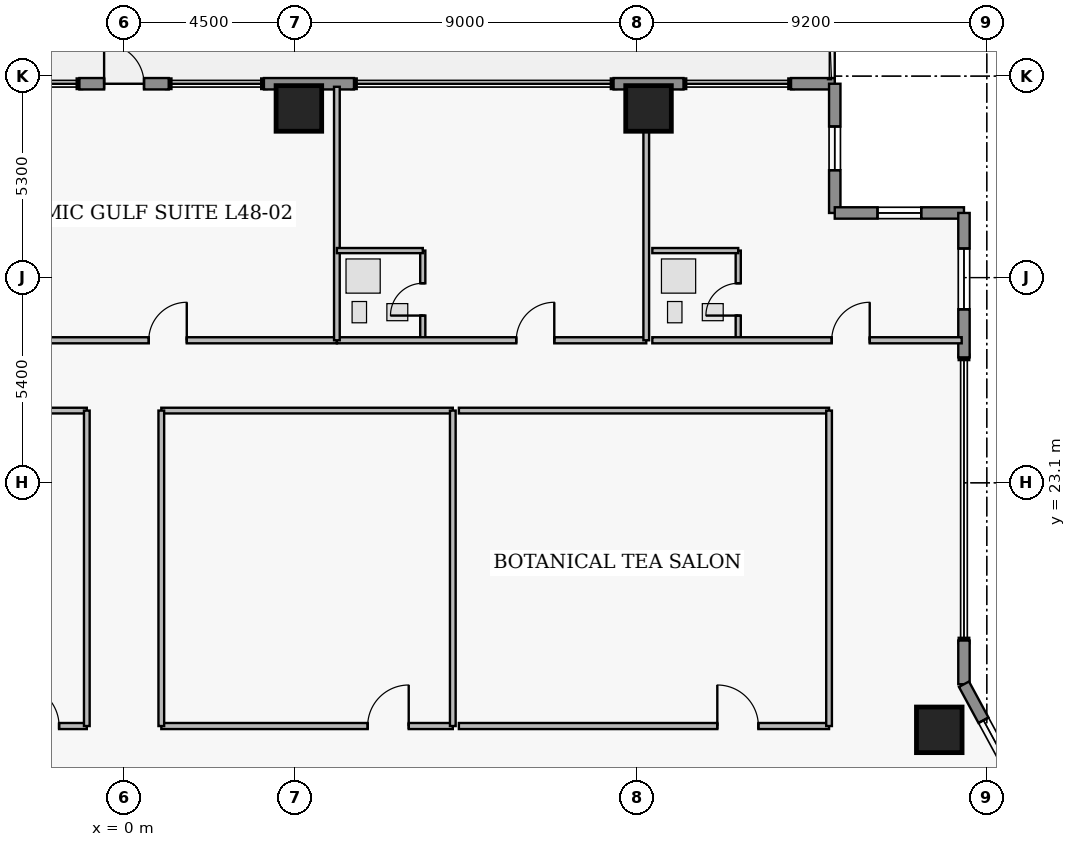
"""IFC4 building model, lengths in metres.
Left out: names, types, materials, properties, quantities, classifications, styles, units other than length and angle.
Written with IfcOpenShell. Run it as: python <this file> out.ifc"""

import sys

from ifc_helpers import new_model, si_unit, direction, frame, frame_2d, origin, origin_2d, place, context, subcontext, project, spatial, rectangle, extrude, element, fill, save


model = new_model("IFC4")
c1 = context("Model", 3, precision=1e-05, world=origin(), true_north=direction((0.0, 1.0)))
c2 = subcontext(c1, "Body", "Model", "MODEL_VIEW")
j1 = project(units=[si_unit("LENGTHUNIT", "METRE"), si_unit("PLANEANGLEUNIT", "RADIAN")], contexts=[c1])
p1 = place(None, origin())
s1 = spatial("IfcSite", under=j1, at=p1, CompositionType="ELEMENT")
p2 = place(p1, origin())
s2 = spatial("IfcBuilding", under=s1, at=p2, CompositionType="ELEMENT")
p3 = place(p2, frame((0.0, 0.0, 192.4)))
s3 = spatial("IfcBuildingStorey", under=s2, at=p3, CompositionType="ELEMENT", Elevation=192.4)
for number, where, z_axis, x_axis in (
    (1, (4.6, 32.95, 0.0), (0.0, 0.0, 1.0), (1.0, 0.0, 0.0)),
    (2, (13.8, 32.95, 0.0), (0.0, 0.0, 1.0), (1.0, 0.0, 0.0)),
    (3, (21.45, 16.6, 0.0), (0.0, 0.0, 1.0), (1.0, 0.0, 0.0)),
):
    element("IfcColumn", number, at=place(p3, frame(where, z_axis=z_axis, x_axis=x_axis)), inside=s3, PredefinedType="COLUMN", context=c2, shape_type="SweptSolid", body=[
        extrude(rectangle(XDim=1.2, YDim=1.2, at=origin_2d()), origin(), (0.0, 0.0, 1.0), 3.75),
    ])
p4 = place(p3, frame((-1.175, 33.6, 0.0), z_axis=(0.0, 0.0, 1.0), x_axis=(1.0, 0.0, 0.0)))
e4 = element("IfcWall", 4, at=p4, inside=s3, PredefinedType="STANDARD", context=c2, shape_type="SweptSolid", body=[
    extrude(rectangle(XDim=2.35, YDim=0.3, at=frame_2d((1.175, 0.0))), origin(), (0.0, 0.0, 1.0), 3.53),
])
p5 = place(p4, frame((0.65, 0.0, 0.0)))
e5 = element("IfcOpeningElement", 5, at=p5, cuts=e4, PredefinedType="OPENING", context=c2, shape_type="SweptSolid", body=[
    extrude(rectangle(XDim=1.05, YDim=2.2, at=frame_2d((0.525, 1.1))), frame((0.0, 0.16, 0.0), z_axis=(0.0, -1.0, 0.0), x_axis=(1.0, 0.0, 0.0)), (0.0, 0.0, 1.0), 0.32),
])
p6 = place(p3, frame((3.68, 33.6, 0.0), z_axis=(0.0, 0.0, 1.0), x_axis=(1.0, 0.0, 0.0)))
e6 = element("IfcWall", 6, at=p6, inside=s3, PredefinedType="STANDARD", context=c2, shape_type="SweptSolid", body=[
    extrude(rectangle(XDim=2.37, YDim=0.3, at=frame_2d((1.185, 0.0))), origin(), (0.0, 0.0, 1.0), 3.53),
])
p7 = place(p3, frame((12.88, 33.6, 0.0), z_axis=(0.0, 0.0, 1.0), x_axis=(1.0, 0.0, 0.0)))
e7 = element("IfcWall", 7, at=p7, inside=s3, PredefinedType="STANDARD", context=c2, shape_type="SweptSolid", body=[
    extrude(rectangle(XDim=1.84, YDim=0.3, at=frame_2d((0.92, 0.0))), origin(), (0.0, 0.0, 1.0), 3.53),
])
p8 = place(p3, frame((17.55, 33.6, 0.0), z_axis=(0.0, 0.0, 1.0), x_axis=(1.0, 0.0, 0.0)))
e8 = element("IfcWall", 8, at=p8, inside=s3, PredefinedType="STANDARD", context=c2, shape_type="SweptSolid", body=[
    extrude(rectangle(XDim=1.15, YDim=0.3, at=frame_2d((0.575, 0.0))), origin(), (0.0, 0.0, 1.0), 3.53),
])
p9 = place(p3, frame((18.7, 33.6, 0.0), z_axis=(0.0, 0.0, 1.0), x_axis=(0.0, -1.0, 0.0)))
e9 = element("IfcWall", 9, at=p9, inside=s3, PredefinedType="STANDARD", context=c2, shape_type="SweptSolid", body=[
    extrude(rectangle(XDim=3.4, YDim=0.3, at=frame_2d((1.7, 0.0))), origin(), (0.0, 0.0, 1.0), 3.53),
])
p10 = place(p9, frame((1.125, 0.0, 1.25)))
e10 = element("IfcOpeningElement", 10, at=p10, cuts=e9, PredefinedType="OPENING", context=c2, shape_type="SweptSolid", body=[
    extrude(rectangle(XDim=1.15, YDim=1.55, at=frame_2d((0.575, 0.775))), frame((0.0, 0.16, 0.0), z_axis=(0.0, -1.0, 0.0), x_axis=(1.0, 0.0, 0.0)), (0.0, 0.0, 1.0), 0.32),
])
p11 = place(p3, frame((18.7, 30.2, 0.0), z_axis=(0.0, 0.0, 1.0), x_axis=(1.0, 0.0, 0.0)))
e11 = element("IfcWall", 11, at=p11, inside=s3, PredefinedType="STANDARD", context=c2, shape_type="SweptSolid", body=[
    extrude(rectangle(XDim=3.4, YDim=0.3, at=frame_2d((1.7, 0.0))), origin(), (0.0, 0.0, 1.0), 3.53),
])
p12 = place(p11, frame((1.125, 0.0, 1.25)))
e12 = element("IfcOpeningElement", 12, at=p12, cuts=e11, PredefinedType="OPENING", context=c2, shape_type="SweptSolid", body=[
    extrude(rectangle(XDim=1.15, YDim=1.55, at=frame_2d((0.575, 0.775))), frame((0.0, 0.16, 0.0), z_axis=(0.0, -1.0, 0.0), x_axis=(1.0, 0.0, 0.0)), (0.0, 0.0, 1.0), 0.32),
])
p13 = place(p3, frame((22.1, 30.2, 0.0), z_axis=(0.0, 0.0, 1.0), x_axis=(0.0, -1.0, 0.0)))
e13 = element("IfcWall", 13, at=p13, inside=s3, PredefinedType="STANDARD", context=c2, shape_type="SweptSolid", body=[
    extrude(rectangle(XDim=3.8, YDim=0.3, at=frame_2d((1.9, 0.0))), origin(), (0.0, 0.0, 1.0), 3.53),
])
p14 = place(p13, frame((0.935, 0.0, 0.85)))
e14 = element("IfcOpeningElement", 14, at=p14, cuts=e13, PredefinedType="OPENING", context=c2, shape_type="SweptSolid", body=[
    extrude(rectangle(XDim=1.6, YDim=1.8, at=frame_2d((0.8, 0.9))), frame((0.0, 0.16, 0.0), z_axis=(0.0, -1.0, 0.0), x_axis=(1.0, 0.0, 0.0)), (0.0, 0.0, 1.0), 0.32),
])
p15 = place(p3, frame((22.1, 18.95, 0.0), z_axis=(0.0, 0.0, 1.0), x_axis=(0.0, -1.0, 0.0)))
e15 = element("IfcWall", 15, at=p15, inside=s3, PredefinedType="STANDARD", context=c2, shape_type="SweptSolid", body=[
    extrude(rectangle(XDim=1.15, YDim=0.3, at=frame_2d((0.575, 0.0))), origin(), (0.0, 0.0, 1.0), 3.53),
])
p16 = place(p3, frame((22.1, 17.8, 0.0), z_axis=(0.0, 0.0, 1.0), x_axis=(0.476258655584, -0.879305233114, 0.0)))
e16 = element("IfcWall", 16, at=p16, inside=s3, PredefinedType="STANDARD", context=c2, shape_type="SweptSolid", body=[
    extrude(rectangle(XDim=5.459, YDim=0.3, at=frame_2d((2.729, 0.0))), origin(), (0.0, 0.0, 1.0), 3.53),
])
p17 = place(p16, frame((1.078, 0.0, 1.25)))
e17 = element("IfcOpeningElement", 17, at=p17, cuts=e16, PredefinedType="OPENING", context=c2, shape_type="SweptSolid", body=[
    extrude(rectangle(XDim=1.15, YDim=1.55, at=frame_2d((0.575, 0.775))), frame((0.0, 0.16, 0.0), z_axis=(0.0, -1.0, 0.0), x_axis=(1.0, 0.0, 0.0)), (0.0, 0.0, 1.0), 0.32),
])
p18 = place(p3, frame((-5.6, 26.85, 0.0), z_axis=(0.0, 0.0, 1.0), x_axis=(1.0, 0.0, 0.0)))
e18 = element("IfcWall", 18, at=p18, inside=s3, PredefinedType="PARTITIONING", context=c2, shape_type="SweptSolid", body=[
    extrude(rectangle(XDim=11.2, YDim=0.16, at=frame_2d((5.6, 0.0))), origin(), (0.0, 0.0, 1.0), 3.53),
])
p19 = place(p18, frame((6.25, 0.0, 0.0)))
e19 = element("IfcOpeningElement", 19, at=p19, cuts=e18, PredefinedType="OPENING", context=c2, shape_type="SweptSolid", body=[
    extrude(rectangle(XDim=1.0, YDim=2.15, at=frame_2d((0.5, 1.075))), frame((0.0, 0.09, 0.0), z_axis=(0.0, -1.0, 0.0), x_axis=(1.0, 0.0, 0.0)), (0.0, 0.0, 1.0), 0.18),
])
p20 = place(p3, frame((7.86, 26.85, 0.0), z_axis=(0.0, 0.0, 1.0), x_axis=(0.0, 1.0, 0.0)))
e20 = element("IfcWall", 20, at=p20, inside=s3, PredefinedType="PLUMBINGWALL", context=c2, shape_type="SweptSolid", body=[
    extrude(rectangle(XDim=2.36, YDim=0.135, at=frame_2d((1.18, 0.0))), origin(), (0.0, 0.0, 1.0), 3.53),
])
p21 = place(p20, frame((0.65, 0.0, 0.0)))
e21 = element("IfcOpeningElement", 21, at=p21, cuts=e20, PredefinedType="OPENING", context=c2, shape_type="SweptSolid", body=[
    extrude(rectangle(XDim=0.85, YDim=2.1, at=frame_2d((0.425, 1.05))), frame((0.0, 0.077, 0.0), z_axis=(0.0, -1.0, 0.0), x_axis=(1.0, 0.0, 0.0)), (0.0, 0.0, 1.0), 0.155),
])
p22 = place(p3, frame((5.6, 26.85, 0.0), z_axis=(0.0, 0.0, 1.0), x_axis=(1.0, 0.0, 0.0)))
e22 = element("IfcWall", 22, at=p22, inside=s3, PredefinedType="PARTITIONING", context=c2, shape_type="SweptSolid", body=[
    extrude(rectangle(XDim=8.14, YDim=0.16, at=frame_2d((4.07, 0.0))), origin(), (0.0, 0.0, 1.0), 3.53),
])
p23 = place(p22, frame((4.72, 0.0, 0.0)))
e23 = element("IfcOpeningElement", 23, at=p23, cuts=e22, PredefinedType="OPENING", context=c2, shape_type="SweptSolid", body=[
    extrude(rectangle(XDim=1.0, YDim=2.15, at=frame_2d((0.5, 1.075))), frame((0.0, 0.09, 0.0), z_axis=(0.0, -1.0, 0.0), x_axis=(1.0, 0.0, 0.0)), (0.0, 0.0, 1.0), 0.18),
])
p24 = place(p3, frame((16.16, 26.85, 0.0), z_axis=(0.0, 0.0, 1.0), x_axis=(0.0, 1.0, 0.0)))
e24 = element("IfcWall", 24, at=p24, inside=s3, PredefinedType="PLUMBINGWALL", context=c2, shape_type="SweptSolid", body=[
    extrude(rectangle(XDim=2.36, YDim=0.135, at=frame_2d((1.18, 0.0))), origin(), (0.0, 0.0, 1.0), 3.53),
])
p25 = place(p24, frame((0.65, 0.0, 0.0)))
e25 = element("IfcOpeningElement", 25, at=p25, cuts=e24, PredefinedType="OPENING", context=c2, shape_type="SweptSolid", body=[
    extrude(rectangle(XDim=0.85, YDim=2.1, at=frame_2d((0.425, 1.05))), frame((0.0, 0.077, 0.0), z_axis=(0.0, -1.0, 0.0), x_axis=(1.0, 0.0, 0.0)), (0.0, 0.0, 1.0), 0.155),
])
p26 = place(p3, frame((13.9, 26.85, 0.0), z_axis=(0.0, 0.0, 1.0), x_axis=(1.0, 0.0, 0.0)))
e26 = element("IfcWall", 26, at=p26, inside=s3, PredefinedType="PARTITIONING", context=c2, shape_type="SweptSolid", body=[
    extrude(rectangle(XDim=8.14, YDim=0.16, at=frame_2d((4.07, 0.0))), origin(), (0.0, 0.0, 1.0), 3.53),
])
p27 = place(p26, frame((4.72, 0.0, 0.0)))
e27 = element("IfcOpeningElement", 27, at=p27, cuts=e26, PredefinedType="OPENING", context=c2, shape_type="SweptSolid", body=[
    extrude(rectangle(XDim=1.0, YDim=2.15, at=frame_2d((0.5, 1.075))), frame((0.0, 0.09, 0.0), z_axis=(0.0, -1.0, 0.0), x_axis=(1.0, 0.0, 0.0)), (0.0, 0.0, 1.0), 0.18),
])
p28 = place(p3, frame((-8.59, 16.7, 0.0), z_axis=(0.0, 0.0, 1.0), x_axis=(1.0, 0.0, 0.0)))
e28 = element("IfcWall", 28, at=p28, inside=s3, PredefinedType="PARTITIONING", context=c2, shape_type="SweptSolid", body=[
    extrude(rectangle(XDim=7.61, YDim=0.16, at=frame_2d((3.805, 0.0))), origin(), (0.0, 0.0, 1.0), 3.124),
])
p29 = place(p28, frame((5.8, 0.0, 0.0)))
e29 = element("IfcOpeningElement", 29, at=p29, cuts=e28, PredefinedType="OPENING", context=c2, shape_type="SweptSolid", body=[
    extrude(rectangle(XDim=1.08, YDim=2.18, at=frame_2d((0.54, 1.09))), frame((0.0, 0.09, 0.0), z_axis=(0.0, -1.0, 0.0), x_axis=(1.0, 0.0, 0.0)), (0.0, 0.0, 1.0), 0.18),
])
p30 = place(p3, frame((0.98, 16.7, 0.0), z_axis=(0.0, 0.0, 1.0), x_axis=(1.0, 0.0, 0.0)))
e30 = element("IfcWall", 30, at=p30, inside=s3, PredefinedType="PARTITIONING", context=c2, shape_type="SweptSolid", body=[
    extrude(rectangle(XDim=7.67, YDim=0.16, at=frame_2d((3.835, 0.0))), origin(), (0.0, 0.0, 1.0), 3.124),
])
p31 = place(p30, frame((5.43, 0.0, 0.0)))
e31 = element("IfcOpeningElement", 31, at=p31, cuts=e30, PredefinedType="OPENING", context=c2, shape_type="SweptSolid", body=[
    extrude(rectangle(XDim=1.08, YDim=2.18, at=frame_2d((0.54, 1.09))), frame((0.0, 0.09, 0.0), z_axis=(0.0, -1.0, 0.0), x_axis=(1.0, 0.0, 0.0)), (0.0, 0.0, 1.0), 0.18),
])
p32 = place(p3, frame((8.81, 16.7, 0.0), z_axis=(0.0, 0.0, 1.0), x_axis=(1.0, 0.0, 0.0)))
e32 = element("IfcWall", 32, at=p32, inside=s3, PredefinedType="PARTITIONING", context=c2, shape_type="SweptSolid", body=[
    extrude(rectangle(XDim=9.74, YDim=0.16, at=frame_2d((4.87, 0.0))), origin(), (0.0, 0.0, 1.0), 3.124),
])
p33 = place(p32, frame((6.8, 0.0, 0.0)))
e33 = element("IfcOpeningElement", 33, at=p33, cuts=e32, PredefinedType="OPENING", context=c2, shape_type="SweptSolid", body=[
    extrude(rectangle(XDim=1.08, YDim=2.18, at=frame_2d((0.54, 1.09))), frame((0.0, 0.09, 0.0), z_axis=(0.0, -1.0, 0.0), x_axis=(1.0, 0.0, 0.0)), (0.0, 0.0, 1.0), 0.18),
])
p34 = place(p3, frame((5.6, 26.85, 0.0), z_axis=(0.0, 0.0, 1.0), x_axis=(0.0, 1.0, 0.0)))
e34 = element("IfcWall", 34, at=p34, inside=s3, PredefinedType="PARTITIONING", context=c2, shape_type="SweptSolid", body=[
    extrude(rectangle(XDim=6.67, YDim=0.15, at=frame_2d((3.335, 0.0))), origin(), (0.0, 0.0, 1.0), 3.53),
])
p35 = place(p3, frame((5.6, 29.21, 0.0), z_axis=(0.0, 0.0, 1.0), x_axis=(1.0, 0.0, 0.0)))
e35 = element("IfcWall", 35, at=p35, inside=s3, PredefinedType="PLUMBINGWALL", context=c2, shape_type="SweptSolid", body=[
    extrude(rectangle(XDim=2.26, YDim=0.135, at=frame_2d((1.13, 0.0))), origin(), (0.0, 0.0, 1.0), 3.53),
])
p36 = place(p3, frame((13.74, 26.85, 0.0), z_axis=(0.0, 0.0, 1.0), x_axis=(0.0, 1.0, 0.0)))
e36 = element("IfcWall", 36, at=p36, inside=s3, PredefinedType="PARTITIONING", context=c2, shape_type="SweptSolid", body=[
    extrude(rectangle(XDim=6.67, YDim=0.15, at=frame_2d((3.335, 0.0))), origin(), (0.0, 0.0, 1.0), 2.519),
])
p37 = place(p3, frame((13.9, 29.21, 0.0), z_axis=(0.0, 0.0, 1.0), x_axis=(1.0, 0.0, 0.0)))
e37 = element("IfcWall", 37, at=p37, inside=s3, PredefinedType="PLUMBINGWALL", context=c2, shape_type="SweptSolid", body=[
    extrude(rectangle(XDim=2.26, YDim=0.135, at=frame_2d((1.13, 0.0))), origin(), (0.0, 0.0, 1.0), 3.53),
])
p38 = place(p3, frame((-8.59, 25.0, 0.0), z_axis=(0.0, 0.0, 1.0), x_axis=(1.0, 0.0, 0.0)))
e38 = element("IfcWall", 38, at=p38, inside=s3, PredefinedType="PARTITIONING", context=c2, shape_type="SweptSolid", body=[
    extrude(rectangle(XDim=7.61, YDim=0.15, at=frame_2d((3.805, 0.0))), origin(), (0.0, 0.0, 1.0), 3.124),
])
p39 = place(p3, frame((-0.98, 16.7, 0.0), z_axis=(0.0, 0.0, 1.0), x_axis=(0.0, 1.0, 0.0)))
e39 = element("IfcWall", 39, at=p39, inside=s3, PredefinedType="PARTITIONING", context=c2, shape_type="SweptSolid", body=[
    extrude(rectangle(XDim=8.3, YDim=0.15, at=frame_2d((4.15, 0.0))), origin(), (0.0, 0.0, 1.0), 3.53),
])
p40 = place(p3, frame((0.98, 25.0, 0.0), z_axis=(0.0, 0.0, 1.0), x_axis=(1.0, 0.0, 0.0)))
e40 = element("IfcWall", 40, at=p40, inside=s3, PredefinedType="PARTITIONING", context=c2, shape_type="SweptSolid", body=[
    extrude(rectangle(XDim=7.67, YDim=0.15, at=frame_2d((3.835, 0.0))), origin(), (0.0, 0.0, 1.0), 3.124),
])
for number, where, z_axis, x_axis in (
    (41, (0.98, 16.7, 0.0), (0.0, 0.0, 1.0), (0.0, 1.0, 0.0)),
    (42, (8.65, 16.7, 0.0), (0.0, 0.0, 1.0), (0.0, 1.0, 0.0)),
):
    element("IfcWall", number, at=place(p3, frame(where, z_axis=z_axis, x_axis=x_axis)), inside=s3, PredefinedType="PARTITIONING", context=c2, shape_type="SweptSolid", body=[
        extrude(rectangle(XDim=8.3, YDim=0.15, at=frame_2d((4.15, 0.0))), origin(), (0.0, 0.0, 1.0), 3.53),
    ])
p41 = place(p3, frame((8.81, 25.0, 0.0), z_axis=(0.0, 0.0, 1.0), x_axis=(1.0, 0.0, 0.0)))
e43 = element("IfcWall", 43, at=p41, inside=s3, PredefinedType="PARTITIONING", context=c2, shape_type="SweptSolid", body=[
    extrude(rectangle(XDim=9.74, YDim=0.15, at=frame_2d((4.87, 0.0))), origin(), (0.0, 0.0, 1.0), 3.124),
])
p42 = place(p3, frame((18.55, 16.7, 0.0), z_axis=(0.0, 0.0, 1.0), x_axis=(0.0, 1.0, 0.0)))
e44 = element("IfcWall", 44, at=p42, inside=s3, PredefinedType="PARTITIONING", context=c2, shape_type="SweptSolid", body=[
    extrude(rectangle(XDim=8.3, YDim=0.15, at=frame_2d((4.15, 0.0))), origin(), (0.0, 0.0, 1.0), 3.53),
])
p43 = place(p5, origin())
e45 = element("IfcDoor", 45, at=p43, inside=s3, OperationType="SINGLE_SWING_LEFT", PredefinedType="DOOR", context=c2, shape_type="SweptSolid", body=[
    extrude(rectangle(XDim=1.05, YDim=2.2, at=frame_2d((0.525, 1.1))), frame((0.0, 0.025, 0.0), z_axis=(0.0, -1.0, 0.0), x_axis=(1.0, 0.0, 0.0)), (0.0, 0.0, 1.0), 0.05),
])
fill(e5, e45)
p44 = place(p10, origin())
e46 = element("IfcWindow", 46, at=p44, inside=s3, PartitioningType="SINGLE_PANEL", PredefinedType="WINDOW", context=c2, shape_type="SweptSolid", body=[
    extrude(rectangle(XDim=1.15, YDim=1.55, at=frame_2d((0.575, 0.775))), frame((0.0, 0.03, 0.0), z_axis=(0.0, -1.0, 0.0), x_axis=(1.0, 0.0, 0.0)), (0.0, 0.0, 1.0), 0.06),
])
fill(e10, e46)
p45 = place(p12, origin())
e47 = element("IfcWindow", 47, at=p45, inside=s3, PartitioningType="SINGLE_PANEL", PredefinedType="WINDOW", context=c2, shape_type="SweptSolid", body=[
    extrude(rectangle(XDim=1.15, YDim=1.55, at=frame_2d((0.575, 0.775))), frame((0.0, 0.03, 0.0), z_axis=(0.0, -1.0, 0.0), x_axis=(1.0, 0.0, 0.0)), (0.0, 0.0, 1.0), 0.06),
])
fill(e12, e47)
p46 = place(p14, origin())
e48 = element("IfcWindow", 48, at=p46, inside=s3, PartitioningType="SINGLE_PANEL", PredefinedType="WINDOW", context=c2, shape_type="SweptSolid", body=[
    extrude(rectangle(XDim=1.6, YDim=1.8, at=frame_2d((0.8, 0.9))), frame((0.0, 0.03, 0.0), z_axis=(0.0, -1.0, 0.0), x_axis=(1.0, 0.0, 0.0)), (0.0, 0.0, 1.0), 0.06),
])
fill(e14, e48)
p47 = place(p17, origin())
e49 = element("IfcWindow", 49, at=p47, inside=s3, PartitioningType="SINGLE_PANEL", PredefinedType="WINDOW", context=c2, shape_type="SweptSolid", body=[
    extrude(rectangle(XDim=1.15, YDim=1.55, at=frame_2d((0.575, 0.775))), frame((0.0, 0.03, 0.0), z_axis=(0.0, -1.0, 0.0), x_axis=(1.0, 0.0, 0.0)), (0.0, 0.0, 1.0), 0.06),
])
fill(e17, e49)
p48 = place(p19, origin())
e50 = element("IfcDoor", 50, at=p48, inside=s3, OperationType="SINGLE_SWING_RIGHT", PredefinedType="DOOR", context=c2, shape_type="SweptSolid", body=[
    extrude(rectangle(XDim=1.0, YDim=2.15, at=frame_2d((0.5, 1.075))), frame((0.0, 0.025, 0.0), z_axis=(0.0, -1.0, 0.0), x_axis=(1.0, 0.0, 0.0)), (0.0, 0.0, 1.0), 0.05),
])
fill(e19, e50)
p49 = place(p21, origin())
e51 = element("IfcDoor", 51, at=p49, inside=s3, OperationType="SINGLE_SWING_LEFT", PredefinedType="DOOR", context=c2, shape_type="SweptSolid", body=[
    extrude(rectangle(XDim=0.85, YDim=2.1, at=frame_2d((0.425, 1.05))), frame((0.0, 0.025, 0.0), z_axis=(0.0, -1.0, 0.0), x_axis=(1.0, 0.0, 0.0)), (0.0, 0.0, 1.0), 0.05),
])
fill(e21, e51)
p50 = place(p23, origin())
e52 = element("IfcDoor", 52, at=p50, inside=s3, OperationType="SINGLE_SWING_RIGHT", PredefinedType="DOOR", context=c2, shape_type="SweptSolid", body=[
    extrude(rectangle(XDim=1.0, YDim=2.15, at=frame_2d((0.5, 1.075))), frame((0.0, 0.025, 0.0), z_axis=(0.0, -1.0, 0.0), x_axis=(1.0, 0.0, 0.0)), (0.0, 0.0, 1.0), 0.05),
])
fill(e23, e52)
p51 = place(p25, origin())
e53 = element("IfcDoor", 53, at=p51, inside=s3, OperationType="SINGLE_SWING_LEFT", PredefinedType="DOOR", context=c2, shape_type="SweptSolid", body=[
    extrude(rectangle(XDim=0.85, YDim=2.1, at=frame_2d((0.425, 1.05))), frame((0.0, 0.025, 0.0), z_axis=(0.0, -1.0, 0.0), x_axis=(1.0, 0.0, 0.0)), (0.0, 0.0, 1.0), 0.05),
])
fill(e25, e53)
p52 = place(p27, origin())
e54 = element("IfcDoor", 54, at=p52, inside=s3, OperationType="SINGLE_SWING_RIGHT", PredefinedType="DOOR", context=c2, shape_type="SweptSolid", body=[
    extrude(rectangle(XDim=1.0, YDim=2.15, at=frame_2d((0.5, 1.075))), frame((0.0, 0.025, 0.0), z_axis=(0.0, -1.0, 0.0), x_axis=(1.0, 0.0, 0.0)), (0.0, 0.0, 1.0), 0.05),
])
fill(e27, e54)
p53 = place(p29, origin())
e55 = element("IfcDoor", 55, at=p53, inside=s3, OperationType="SINGLE_SWING_LEFT", PredefinedType="DOOR", context=c2, shape_type="SweptSolid", body=[
    extrude(rectangle(XDim=1.08, YDim=2.18, at=frame_2d((0.54, 1.09))), frame((0.0, 0.025, 0.0), z_axis=(0.0, -1.0, 0.0), x_axis=(1.0, 0.0, 0.0)), (0.0, 0.0, 1.0), 0.05),
])
fill(e29, e55)
p54 = place(p31, origin())
e56 = element("IfcDoor", 56, at=p54, inside=s3, OperationType="SINGLE_SWING_RIGHT", PredefinedType="DOOR", context=c2, shape_type="SweptSolid", body=[
    extrude(rectangle(XDim=1.08, YDim=2.18, at=frame_2d((0.54, 1.09))), frame((0.0, 0.025, 0.0), z_axis=(0.0, -1.0, 0.0), x_axis=(1.0, 0.0, 0.0)), (0.0, 0.0, 1.0), 0.05),
])
fill(e31, e56)
p55 = place(p33, origin())
e57 = element("IfcDoor", 57, at=p55, inside=s3, OperationType="SINGLE_SWING_LEFT", PredefinedType="DOOR", context=c2, shape_type="SweptSolid", body=[
    extrude(rectangle(XDim=1.08, YDim=2.18, at=frame_2d((0.54, 1.09))), frame((0.0, 0.025, 0.0), z_axis=(0.0, -1.0, 0.0), x_axis=(1.0, 0.0, 0.0)), (0.0, 0.0, 1.0), 0.05),
])
fill(e33, e57)
save(model, sys.argv[1])
